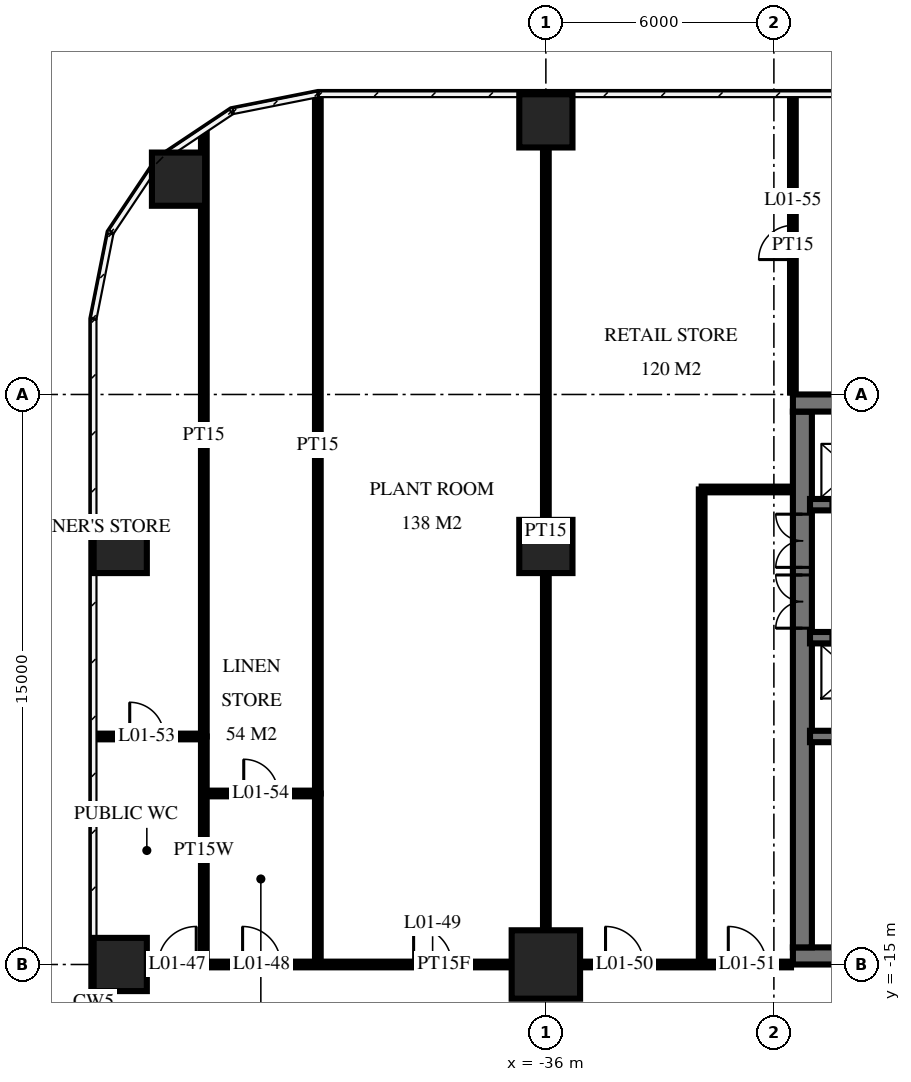
"""IFC4 building model, lengths in metres.
Left out: names, types, materials, properties, quantities, classifications, styles, units other than length and angle.
Written with IfcOpenShell. Run it as: python <this file> out.ifc"""

import sys

from ifc_helpers import new_model, si_unit, direction, frame, frame_2d, origin, origin_2d, place, context, subcontext, project, spatial, rectangle, circle, extrude, element, fill, save


model = new_model("IFC4")
c1 = context("Model", 3, precision=1e-05, world=origin(), true_north=direction((0.0, 1.0)))
c2 = subcontext(c1, "Body", "Model", "MODEL_VIEW")
j1 = project(units=[si_unit("LENGTHUNIT", "METRE"), si_unit("PLANEANGLEUNIT", "RADIAN")], contexts=[c1])
p1 = place(None, origin())
s1 = spatial("IfcSite", under=j1, at=p1, CompositionType="ELEMENT")
p2 = place(p1, origin())
s2 = spatial("IfcBuilding", under=s1, at=p2, CompositionType="ELEMENT")
p3 = place(p2, frame((0.0, 0.0, 7.0)))
s3 = spatial("IfcBuildingStorey", under=s2, at=p3, CompositionType="ELEMENT", Elevation=7.0)
for number, where, z_axis, x_axis in (
    (1, (-47.2, -15.0, 0.0), (0.0, 0.0, 1.0), (1.0, 0.0, 0.0)),
    (2, (-47.2, -4.0, 0.0), (0.0, 0.0, 1.0), (1.0, 0.0, 0.0)),
    (3, (-45.666, 5.666, 0.0), (0.0, 0.0, 1.0), (1.0, 0.0, 0.0)),
):
    element("IfcColumn", number, at=place(p3, frame(where, z_axis=z_axis, x_axis=x_axis)), inside=s3, PredefinedType="COLUMN", context=c2, shape_type="SweptSolid", body=[
        extrude(circle(Radius=0.7, at=origin_2d()), origin(), (0.0, 0.0, 1.0), 5.5),
    ])
p4 = place(p3, frame((-36.0, -15.0, 0.0), z_axis=(0.0, 0.0, 1.0), x_axis=(1.0, 0.0, 0.0)))
e4 = element("IfcColumn", 4, at=p4, inside=s3, PredefinedType="COLUMN", context=c2, shape_type="SweptSolid", body=[
    extrude(circle(Radius=0.9, at=origin_2d()), origin(), (0.0, 0.0, 1.0), 5.5),
])
for number, where, z_axis, x_axis in (
    (5, (-36.0, -4.0, 0.0), (0.0, 0.0, 1.0), (1.0, 0.0, 0.0)),
    (6, (-36.0, 7.2, 0.0), (0.0, 0.0, 1.0), (1.0, 0.0, 0.0)),
):
    element("IfcColumn", number, at=place(p3, frame(where, z_axis=z_axis, x_axis=x_axis)), inside=s3, PredefinedType="COLUMN", context=c2, shape_type="SweptSolid", body=[
        extrude(circle(Radius=0.7, at=origin_2d()), origin(), (0.0, 0.0, 1.0), 5.5),
    ])
p5 = place(p3, frame((-29.5, -0.225, 0.0), z_axis=(0.0, 0.0, 1.0), x_axis=(1.0, 0.0, 0.0)))
e7 = element("IfcWall", 7, at=p5, inside=s3, PredefinedType="SHEAR", context=c2, shape_type="SweptSolid", body=[
    extrude(rectangle(XDim=19.5, YDim=0.45, at=frame_2d((9.75, 0.0))), origin(), (0.0, 0.0, 1.0), 5.5),
])
p6 = place(p3, frame((-29.5, -14.775, 0.0), z_axis=(0.0, 0.0, 1.0), x_axis=(1.0, 0.0, 0.0)))
e8 = element("IfcWall", 8, at=p6, inside=s3, PredefinedType="SHEAR", context=c2, shape_type="SweptSolid", body=[
    extrude(rectangle(XDim=19.5, YDim=0.45, at=frame_2d((9.75, 0.0))), origin(), (0.0, 0.0, 1.0), 5.5),
])
p7 = place(p6, frame((11.2, 0.0, 0.0)))
e9 = element("IfcOpeningElement", 9, at=p7, cuts=e8, PredefinedType="OPENING", context=c2, shape_type="SweptSolid", body=[
    extrude(rectangle(XDim=1.2, YDim=2.1, at=frame_2d((0.6, 1.05))), frame((0.0, 0.235, 0.0), z_axis=(0.0, -1.0, 0.0), x_axis=(1.0, 0.0, 0.0)), (0.0, 0.0, 1.0), 0.47),
])
p8 = place(p6, frame((14.25, 0.0, 0.0)))
e10 = element("IfcOpeningElement", 10, at=p8, cuts=e8, PredefinedType="OPENING", context=c2, shape_type="SweptSolid", body=[
    extrude(rectangle(XDim=1.1, YDim=2.1, at=frame_2d((0.55, 1.05))), frame((0.0, 0.235, 0.0), z_axis=(0.0, -1.0, 0.0), x_axis=(1.0, 0.0, 0.0)), (0.0, 0.0, 1.0), 0.47),
])
p9 = place(p6, frame((8.5, 0.0, 0.0)))
e11 = element("IfcOpeningElement", 11, at=p9, cuts=e8, PredefinedType="OPENING", context=c2, shape_type="SweptSolid", body=[
    extrude(rectangle(XDim=0.9, YDim=2.1, at=frame_2d((0.45, 1.05))), frame((0.0, 0.235, 0.0), z_axis=(0.0, -1.0, 0.0), x_axis=(1.0, 0.0, 0.0)), (0.0, 0.0, 1.0), 0.47),
])
p10 = place(p6, frame((6.05, 0.0, 0.0)))
e12 = element("IfcOpeningElement", 12, at=p10, cuts=e8, PredefinedType="OPENING", context=c2, shape_type="SweptSolid", body=[
    extrude(rectangle(XDim=1.0, YDim=2.1, at=frame_2d((0.5, 1.05))), frame((0.0, 0.235, 0.0), z_axis=(0.0, -1.0, 0.0), x_axis=(1.0, 0.0, 0.0)), (0.0, 0.0, 1.0), 0.47),
])
p11 = place(p6, frame((3.413, 0.0, 0.0)))
e13 = element("IfcOpeningElement", 13, at=p11, cuts=e8, PredefinedType="OPENING", context=c2, shape_type="SweptSolid", body=[
    extrude(rectangle(XDim=1.0, YDim=2.1, at=frame_2d((0.5, 1.05))), frame((0.0, 0.235, 0.0), z_axis=(0.0, -1.0, 0.0), x_axis=(1.0, 0.0, 0.0)), (0.0, 0.0, 1.0), 0.47),
])
p12 = place(p6, frame((1.087, 0.0, 0.0)))
e14 = element("IfcOpeningElement", 14, at=p12, cuts=e8, PredefinedType="OPENING", context=c2, shape_type="SweptSolid", body=[
    extrude(rectangle(XDim=1.0, YDim=2.1, at=frame_2d((0.5, 1.05))), frame((0.0, 0.235, 0.0), z_axis=(0.0, -1.0, 0.0), x_axis=(1.0, 0.0, 0.0)), (0.0, 0.0, 1.0), 0.47),
])
p13 = place(p3, frame((-29.25, -14.55, 0.0), z_axis=(0.0, 0.0, 1.0), x_axis=(0.0, 1.0, 0.0)))
e15 = element("IfcWall", 15, at=p13, inside=s3, PredefinedType="SHEAR", context=c2, shape_type="SweptSolid", body=[
    extrude(rectangle(XDim=14.1, YDim=0.5, at=frame_2d((7.05, 0.0))), origin(), (0.0, 0.0, 1.0), 5.5),
])
p14 = place(p13, frame((8.4, 0.0, 0.0)))
e16 = element("IfcOpeningElement", 16, at=p14, cuts=e15, PredefinedType="OPENING", context=c2, shape_type="SweptSolid", body=[
    extrude(rectangle(XDim=1.4, YDim=2.4, at=frame_2d((0.7, 1.2))), frame((0.0, 0.26, 0.0), z_axis=(0.0, -1.0, 0.0), x_axis=(1.0, 0.0, 0.0)), (0.0, 0.0, 1.0), 0.52),
])
p15 = place(p13, frame((10.0, 0.0, 0.0)))
e17 = element("IfcOpeningElement", 17, at=p15, cuts=e15, PredefinedType="OPENING", context=c2, shape_type="SweptSolid", body=[
    extrude(rectangle(XDim=1.4, YDim=2.4, at=frame_2d((0.7, 1.2))), frame((0.0, 0.26, 0.0), z_axis=(0.0, -1.0, 0.0), x_axis=(1.0, 0.0, 0.0)), (0.0, 0.0, 1.0), 0.52),
])
p16 = place(p3, frame((-29.05, -2.9, 0.0), z_axis=(0.0, 0.0, 1.0), x_axis=(1.0, 0.0, 0.0)))
e18 = element("IfcWall", 18, at=p16, inside=s3, PredefinedType="SHEAR", context=c2, shape_type="SweptSolid", body=[
    extrude(rectangle(XDim=18.7, YDim=0.3, at=frame_2d((9.35, 0.0))), origin(), (0.0, 0.0, 1.0), 5.5),
])
p17 = place(p16, frame((2.95, 0.0, 0.0)))
e19 = element("IfcOpeningElement", 19, at=p17, cuts=e18, PredefinedType="OPENING", context=c2, shape_type="SweptSolid", body=[
    extrude(rectangle(XDim=1.1, YDim=2.1, at=frame_2d((0.55, 1.05))), frame((0.0, 0.16, 0.0), z_axis=(0.0, -1.0, 0.0), x_axis=(1.0, 0.0, 0.0)), (0.0, 0.0, 1.0), 0.32),
])
p18 = place(p16, frame((0.55, 0.0, 0.0)))
e20 = element("IfcOpeningElement", 20, at=p18, cuts=e18, PredefinedType="OPENING", context=c2, shape_type="SweptSolid", body=[
    extrude(rectangle(XDim=1.1, YDim=2.1, at=frame_2d((0.55, 1.05))), frame((0.0, 0.16, 0.0), z_axis=(0.0, -1.0, 0.0), x_axis=(1.0, 0.0, 0.0)), (0.0, 0.0, 1.0), 0.32),
])
p19 = place(p16, frame((10.9, 0.0, 0.0)))
e21 = element("IfcOpeningElement", 21, at=p19, cuts=e18, PredefinedType="OPENING", context=c2, shape_type="SweptSolid", body=[
    extrude(rectangle(XDim=0.9, YDim=2.1, at=frame_2d((0.45, 1.05))), frame((0.0, 0.16, 0.0), z_axis=(0.0, -1.0, 0.0), x_axis=(1.0, 0.0, 0.0)), (0.0, 0.0, 1.0), 0.32),
])
p20 = place(p16, frame((16.85, 0.0, 0.0)))
e22 = element("IfcOpeningElement", 22, at=p20, cuts=e18, PredefinedType="OPENING", context=c2, shape_type="SweptSolid", body=[
    extrude(rectangle(XDim=1.0, YDim=2.1, at=frame_2d((0.5, 1.05))), frame((0.0, 0.16, 0.0), z_axis=(0.0, -1.0, 0.0), x_axis=(1.0, 0.0, 0.0)), (0.0, 0.0, 1.0), 0.32),
])
p21 = place(p16, frame((13.85, 0.0, 0.0)))
e23 = element("IfcOpeningElement", 23, at=p21, cuts=e18, PredefinedType="OPENING", context=c2, shape_type="SweptSolid", body=[
    extrude(rectangle(XDim=1.0, YDim=2.1, at=frame_2d((0.5, 1.05))), frame((0.0, 0.16, 0.0), z_axis=(0.0, -1.0, 0.0), x_axis=(1.0, 0.0, 0.0)), (0.0, 0.0, 1.0), 0.32),
])
p22 = place(p16, frame((5.6, 0.0, 0.0)))
e24 = element("IfcOpeningElement", 24, at=p22, cuts=e18, PredefinedType="OPENING", context=c2, shape_type="SweptSolid", body=[
    extrude(rectangle(XDim=1.0, YDim=2.1, at=frame_2d((0.5, 1.05))), frame((0.0, 0.16, 0.0), z_axis=(0.0, -1.0, 0.0), x_axis=(1.0, 0.0, 0.0)), (0.0, 0.0, 1.0), 0.32),
])
p23 = place(p3, frame((-29.05, -6.4, 0.0), z_axis=(0.0, 0.0, 1.0), x_axis=(1.0, 0.0, 0.0)))
e25 = element("IfcWall", 25, at=p23, inside=s3, PredefinedType="SHEAR", context=c2, shape_type="SweptSolid", body=[
    extrude(rectangle(XDim=18.7, YDim=0.3, at=frame_2d((9.35, 0.0))), origin(), (0.0, 0.0, 1.0), 5.5),
])
p24 = place(p23, frame((2.95, 0.0, 0.0)))
e26 = element("IfcOpeningElement", 26, at=p24, cuts=e25, PredefinedType="OPENING", context=c2, shape_type="SweptSolid", body=[
    extrude(rectangle(XDim=1.1, YDim=2.1, at=frame_2d((0.55, 1.05))), frame((0.0, 0.16, 0.0), z_axis=(0.0, -1.0, 0.0), x_axis=(1.0, 0.0, 0.0)), (0.0, 0.0, 1.0), 0.32),
])
p25 = place(p23, frame((0.55, 0.0, 0.0)))
e27 = element("IfcOpeningElement", 27, at=p25, cuts=e25, PredefinedType="OPENING", context=c2, shape_type="SweptSolid", body=[
    extrude(rectangle(XDim=1.1, YDim=2.1, at=frame_2d((0.55, 1.05))), frame((0.0, 0.16, 0.0), z_axis=(0.0, -1.0, 0.0), x_axis=(1.0, 0.0, 0.0)), (0.0, 0.0, 1.0), 0.32),
])
p26 = place(p23, frame((10.8, 0.0, 0.0)))
e28 = element("IfcOpeningElement", 28, at=p26, cuts=e25, PredefinedType="OPENING", context=c2, shape_type="SweptSolid", body=[
    extrude(rectangle(XDim=1.1, YDim=2.1, at=frame_2d((0.55, 1.05))), frame((0.0, 0.16, 0.0), z_axis=(0.0, -1.0, 0.0), x_axis=(1.0, 0.0, 0.0)), (0.0, 0.0, 1.0), 0.32),
])
p27 = place(p23, frame((5.6, 0.0, 0.0)))
e29 = element("IfcOpeningElement", 29, at=p27, cuts=e25, PredefinedType="OPENING", context=c2, shape_type="SweptSolid", body=[
    extrude(rectangle(XDim=1.0, YDim=2.1, at=frame_2d((0.5, 1.05))), frame((0.0, 0.16, 0.0), z_axis=(0.0, -1.0, 0.0), x_axis=(1.0, 0.0, 0.0)), (0.0, 0.0, 1.0), 0.32),
])
p28 = place(p3, frame((-29.05, -9.0, 0.0), z_axis=(0.0, 0.0, 1.0), x_axis=(1.0, 0.0, 0.0)))
e30 = element("IfcWall", 30, at=p28, inside=s3, PredefinedType="SHEAR", context=c2, shape_type="SweptSolid", body=[
    extrude(rectangle(XDim=18.7, YDim=0.3, at=frame_2d((9.35, 0.0))), origin(), (0.0, 0.0, 1.0), 5.5),
])
p29 = place(p28, frame((13.8, 0.0, 0.0)))
e31 = element("IfcOpeningElement", 31, at=p29, cuts=e30, PredefinedType="OPENING", context=c2, shape_type="SweptSolid", body=[
    extrude(rectangle(XDim=1.1, YDim=2.1, at=frame_2d((0.55, 1.05))), frame((0.0, 0.16, 0.0), z_axis=(0.0, -1.0, 0.0), x_axis=(1.0, 0.0, 0.0)), (0.0, 0.0, 1.0), 0.32),
])
p30 = place(p3, frame((-29.5, 0.05, 0.0), z_axis=(0.0, 0.0, 1.0), x_axis=(0.0, 1.0, 0.0)))
e32 = element("IfcWall", 32, at=p30, inside=s3, PredefinedType="PARTITIONING", context=c2, shape_type="SweptSolid", body=[
    extrude(rectangle(XDim=7.77, YDim=0.15, at=frame_2d((3.885, 0.0))), origin(), (0.0, 0.0, 1.0), 5.05),
])
p31 = place(p30, frame((3.5, 0.0, 0.0)))
e33 = element("IfcOpeningElement", 33, at=p31, cuts=e32, PredefinedType="OPENING", context=c2, shape_type="SweptSolid", body=[
    extrude(rectangle(XDim=0.9, YDim=2.1, at=frame_2d((0.45, 1.05))), frame((0.0, 0.085, 0.0), z_axis=(0.0, -1.0, 0.0), x_axis=(1.0, 0.0, 0.0)), (0.0, 0.0, 1.0), 0.17),
])
p32 = place(p3, frame((-31.9, -15.0, 0.0), z_axis=(0.0, 0.0, 1.0), x_axis=(0.0, 1.0, 0.0)))
e34 = element("IfcWall", 34, at=p32, inside=s3, PredefinedType="PARTITIONING", context=c2, shape_type="SweptSolid", body=[
    extrude(rectangle(XDim=12.5, YDim=0.15, at=frame_2d((6.25, 0.0))), origin(), (0.0, 0.0, 1.0), 5.05),
])
p33 = place(p3, frame((-36.0, -15.0, 0.0), z_axis=(0.0, 0.0, 1.0), x_axis=(0.0, 1.0, 0.0)))
e35 = element("IfcWall", 35, at=p33, inside=s3, PredefinedType="PARTITIONING", context=c2, shape_type="SweptSolid", body=[
    extrude(rectangle(XDim=22.82, YDim=0.15, at=frame_2d((11.41, 0.0))), origin(), (0.0, 0.0, 1.0), 5.05),
])
p34 = place(p3, frame((-42.0, -10.5, 0.0), z_axis=(0.0, 0.0, 1.0), x_axis=(0.0, 1.0, 0.0)))
e36 = element("IfcWall", 36, at=p34, inside=s3, PredefinedType="PARTITIONING", context=c2, shape_type="SweptSolid", body=[
    extrude(rectangle(XDim=18.316, YDim=0.15, at=frame_2d((9.158, 0.0))), origin(), (0.0, 0.0, 1.0), 5.05),
])
p35 = place(p3, frame((-42.0, -15.0, 0.0), z_axis=(0.0, 0.0, 1.0), x_axis=(0.0, 1.0, 0.0)))
e37 = element("IfcWall", 37, at=p35, inside=s3, PredefinedType="PLUMBINGWALL", context=c2, shape_type="SweptSolid", body=[
    extrude(rectangle(XDim=4.5, YDim=0.15, at=frame_2d((2.25, 0.0))), origin(), (0.0, 0.0, 1.0), 5.05),
])
p36 = place(p3, frame((-45.0, -9.0, 0.0), z_axis=(0.0, 0.0, 1.0), x_axis=(0.0, 1.0, 0.0)))
e38 = element("IfcWall", 38, at=p36, inside=s3, PredefinedType="PARTITIONING", context=c2, shape_type="SweptSolid", body=[
    extrude(rectangle(XDim=15.856, YDim=0.15, at=frame_2d((7.928, 0.0))), origin(), (0.0, 0.0, 1.0), 5.05),
])
p37 = place(p3, frame((-45.0, -15.0, 0.0), z_axis=(0.0, 0.0, 1.0), x_axis=(0.0, 1.0, 0.0)))
e39 = element("IfcWall", 39, at=p37, inside=s3, PredefinedType="PLUMBINGWALL", context=c2, shape_type="SweptSolid", body=[
    extrude(rectangle(XDim=6.0, YDim=0.15, at=frame_2d((3.0, 0.0))), origin(), (0.0, 0.0, 1.0), 5.05),
])
p38 = place(p3, frame((-47.82, -15.0, 0.0), z_axis=(0.0, 0.0, 1.0), x_axis=(1.0, 0.0, 0.0)))
e40 = element("IfcWall", 40, at=p38, inside=s3, PredefinedType="PARTITIONING", context=c2, shape_type="SweptSolid", body=[
    extrude(rectangle(XDim=18.27, YDim=0.15, at=frame_2d((9.135, 0.0))), origin(), (0.0, 0.0, 1.0), 5.05),
])
p39 = place(p38, frame((1.62, 0.0, 0.0)))
e41 = element("IfcOpeningElement", 41, at=p39, cuts=e40, PredefinedType="OPENING", context=c2, shape_type="SweptSolid", body=[
    extrude(rectangle(XDim=1.0, YDim=2.1, at=frame_2d((0.5, 1.05))), frame((0.0, 0.085, 0.0), z_axis=(0.0, -1.0, 0.0), x_axis=(1.0, 0.0, 0.0)), (0.0, 0.0, 1.0), 0.17),
])
p40 = place(p38, frame((3.84, 0.0, 0.0)))
e42 = element("IfcOpeningElement", 42, at=p40, cuts=e40, PredefinedType="OPENING", context=c2, shape_type="SweptSolid", body=[
    extrude(rectangle(XDim=1.0, YDim=2.1, at=frame_2d((0.5, 1.05))), frame((0.0, 0.085, 0.0), z_axis=(0.0, -1.0, 0.0), x_axis=(1.0, 0.0, 0.0)), (0.0, 0.0, 1.0), 0.17),
])
p41 = place(p38, frame((8.34, 0.0, 0.0)))
e43 = element("IfcOpeningElement", 43, at=p41, cuts=e40, PredefinedType="OPENING", context=c2, shape_type="SweptSolid", body=[
    extrude(rectangle(XDim=1.0, YDim=2.1, at=frame_2d((0.5, 1.05))), frame((0.0, 0.085, 0.0), z_axis=(0.0, -1.0, 0.0), x_axis=(1.0, 0.0, 0.0)), (0.0, 0.0, 1.0), 0.17),
])
p42 = place(p38, frame((13.39, 0.0, 0.0)))
e44 = element("IfcOpeningElement", 44, at=p42, cuts=e40, PredefinedType="OPENING", context=c2, shape_type="SweptSolid", body=[
    extrude(rectangle(XDim=1.0, YDim=2.1, at=frame_2d((0.5, 1.05))), frame((0.0, 0.085, 0.0), z_axis=(0.0, -1.0, 0.0), x_axis=(1.0, 0.0, 0.0)), (0.0, 0.0, 1.0), 0.17),
])
p43 = place(p38, frame((16.62, 0.0, 0.0)))
e45 = element("IfcOpeningElement", 45, at=p43, cuts=e40, PredefinedType="OPENING", context=c2, shape_type="SweptSolid", body=[
    extrude(rectangle(XDim=1.0, YDim=2.1, at=frame_2d((0.5, 1.05))), frame((0.0, 0.085, 0.0), z_axis=(0.0, -1.0, 0.0), x_axis=(1.0, 0.0, 0.0)), (0.0, 0.0, 1.0), 0.17),
])
p44 = place(p3, frame((-45.0, -10.5, 0.0), z_axis=(0.0, 0.0, 1.0), x_axis=(1.0, 0.0, 0.0)))
e46 = element("IfcWall", 46, at=p44, inside=s3, PredefinedType="PLUMBINGWALL", context=c2, shape_type="SweptSolid", body=[
    extrude(rectangle(XDim=3.0, YDim=0.15, at=frame_2d((1.5, 0.0))), origin(), (0.0, 0.0, 1.0), 5.05),
])
p45 = place(p44, frame((1.05, 0.0, 0.0)))
e47 = element("IfcOpeningElement", 47, at=p45, cuts=e46, PredefinedType="OPENING", context=c2, shape_type="SweptSolid", body=[
    extrude(rectangle(XDim=0.9, YDim=2.1, at=frame_2d((0.45, 1.05))), frame((0.0, 0.085, 0.0), z_axis=(0.0, -1.0, 0.0), x_axis=(1.0, 0.0, 0.0)), (0.0, 0.0, 1.0), 0.17),
])
p46 = place(p3, frame((-47.82, -9.0, 0.0), z_axis=(0.0, 0.0, 1.0), x_axis=(1.0, 0.0, 0.0)))
e48 = element("IfcWall", 48, at=p46, inside=s3, PredefinedType="PLUMBINGWALL", context=c2, shape_type="SweptSolid", body=[
    extrude(rectangle(XDim=2.82, YDim=0.15, at=frame_2d((1.41, 0.0))), origin(), (0.0, 0.0, 1.0), 5.05),
])
p47 = place(p46, frame((0.87, 0.0, 0.0)))
e49 = element("IfcOpeningElement", 49, at=p47, cuts=e48, PredefinedType="OPENING", context=c2, shape_type="SweptSolid", body=[
    extrude(rectangle(XDim=0.9, YDim=2.1, at=frame_2d((0.45, 1.05))), frame((0.0, 0.085, 0.0), z_axis=(0.0, -1.0, 0.0), x_axis=(1.0, 0.0, 0.0)), (0.0, 0.0, 1.0), 0.17),
])
p48 = place(p3, frame((-31.9, -2.5, 0.0), z_axis=(0.0, 0.0, 1.0), x_axis=(1.0, 0.0, 0.0)))
e50 = element("IfcWall", 50, at=p48, inside=s3, PredefinedType="PARTITIONING", context=c2, shape_type="SweptSolid", body=[
    extrude(rectangle(XDim=2.35, YDim=0.15, at=frame_2d((1.175, 0.0))), origin(), (0.0, 0.0, 1.0), 5.05),
])
p49 = place(p14, origin())
e51 = element("IfcDoor", 51, at=p49, inside=s3, OperationType="DOUBLE_DOOR_SINGLE_SWING", PredefinedType="DOOR", context=c2, shape_type="SweptSolid", body=[
    extrude(rectangle(XDim=1.4, YDim=2.4, at=frame_2d((0.7, 1.2))), frame((0.0, 0.025, 0.0), z_axis=(0.0, -1.0, 0.0), x_axis=(1.0, 0.0, 0.0)), (0.0, 0.0, 1.0), 0.05),
])
fill(e16, e51)
p50 = place(p15, origin())
e52 = element("IfcDoor", 52, at=p50, inside=s3, OperationType="DOUBLE_DOOR_SINGLE_SWING", PredefinedType="DOOR", context=c2, shape_type="SweptSolid", body=[
    extrude(rectangle(XDim=1.4, YDim=2.4, at=frame_2d((0.7, 1.2))), frame((0.0, 0.025, 0.0), z_axis=(0.0, -1.0, 0.0), x_axis=(1.0, 0.0, 0.0)), (0.0, 0.0, 1.0), 0.05),
])
fill(e17, e52)
p51 = place(p39, origin())
e53 = element("IfcDoor", 53, at=p51, inside=s3, OperationType="SINGLE_SWING_LEFT", PredefinedType="DOOR", context=c2, shape_type="SweptSolid", body=[
    extrude(rectangle(XDim=1.0, YDim=2.1, at=frame_2d((0.5, 1.05))), frame((0.0, 0.025, 0.0), z_axis=(0.0, -1.0, 0.0), x_axis=(1.0, 0.0, 0.0)), (0.0, 0.0, 1.0), 0.05),
])
fill(e41, e53)
p52 = place(p40, origin())
e54 = element("IfcDoor", 54, at=p52, inside=s3, OperationType="SINGLE_SWING_RIGHT", PredefinedType="DOOR", context=c2, shape_type="SweptSolid", body=[
    extrude(rectangle(XDim=1.0, YDim=2.1, at=frame_2d((0.5, 1.05))), frame((0.0, 0.025, 0.0), z_axis=(0.0, -1.0, 0.0), x_axis=(1.0, 0.0, 0.0)), (0.0, 0.0, 1.0), 0.05),
])
fill(e42, e54)
p53 = place(p41, origin())
e55 = element("IfcDoor", 55, at=p53, inside=s3, OperationType="SINGLE_SWING_RIGHT", PredefinedType="DOOR", context=c2, shape_type="SweptSolid", body=[
    extrude(rectangle(XDim=1.0, YDim=2.1, at=frame_2d((0.5, 1.05))), frame((0.0, 0.025, 0.0), z_axis=(0.0, -1.0, 0.0), x_axis=(1.0, 0.0, 0.0)), (0.0, 0.0, 1.0), 0.05),
])
fill(e43, e55)
p54 = place(p42, origin())
e56 = element("IfcDoor", 56, at=p54, inside=s3, OperationType="SINGLE_SWING_RIGHT", PredefinedType="DOOR", context=c2, shape_type="SweptSolid", body=[
    extrude(rectangle(XDim=1.0, YDim=2.1, at=frame_2d((0.5, 1.05))), frame((0.0, 0.025, 0.0), z_axis=(0.0, -1.0, 0.0), x_axis=(1.0, 0.0, 0.0)), (0.0, 0.0, 1.0), 0.05),
])
fill(e44, e56)
p55 = place(p43, origin())
e57 = element("IfcDoor", 57, at=p55, inside=s3, OperationType="SINGLE_SWING_RIGHT", PredefinedType="DOOR", context=c2, shape_type="SweptSolid", body=[
    extrude(rectangle(XDim=1.0, YDim=2.1, at=frame_2d((0.5, 1.05))), frame((0.0, 0.025, 0.0), z_axis=(0.0, -1.0, 0.0), x_axis=(1.0, 0.0, 0.0)), (0.0, 0.0, 1.0), 0.05),
])
fill(e45, e57)
p56 = place(p47, origin())
e58 = element("IfcDoor", 58, at=p56, inside=s3, OperationType="SINGLE_SWING_RIGHT", PredefinedType="DOOR", context=c2, shape_type="SweptSolid", body=[
    extrude(rectangle(XDim=0.9, YDim=2.1, at=frame_2d((0.45, 1.05))), frame((0.0, 0.025, 0.0), z_axis=(0.0, -1.0, 0.0), x_axis=(1.0, 0.0, 0.0)), (0.0, 0.0, 1.0), 0.05),
])
fill(e49, e58)
p57 = place(p45, origin())
e59 = element("IfcDoor", 59, at=p57, inside=s3, OperationType="SINGLE_SWING_RIGHT", PredefinedType="DOOR", context=c2, shape_type="SweptSolid", body=[
    extrude(rectangle(XDim=0.9, YDim=2.1, at=frame_2d((0.45, 1.05))), frame((0.0, 0.025, 0.0), z_axis=(0.0, -1.0, 0.0), x_axis=(1.0, 0.0, 0.0)), (0.0, 0.0, 1.0), 0.05),
])
fill(e47, e59)
p58 = place(p31, origin())
e60 = element("IfcDoor", 60, at=p58, inside=s3, OperationType="SINGLE_SWING_RIGHT", PredefinedType="DOOR", context=c2, shape_type="SweptSolid", body=[
    extrude(rectangle(XDim=0.9, YDim=2.1, at=frame_2d((0.45, 1.05))), frame((0.0, 0.025, 0.0), z_axis=(0.0, -1.0, 0.0), x_axis=(1.0, 0.0, 0.0)), (0.0, 0.0, 1.0), 0.05),
])
fill(e33, e60)
save(model, sys.argv[1])
